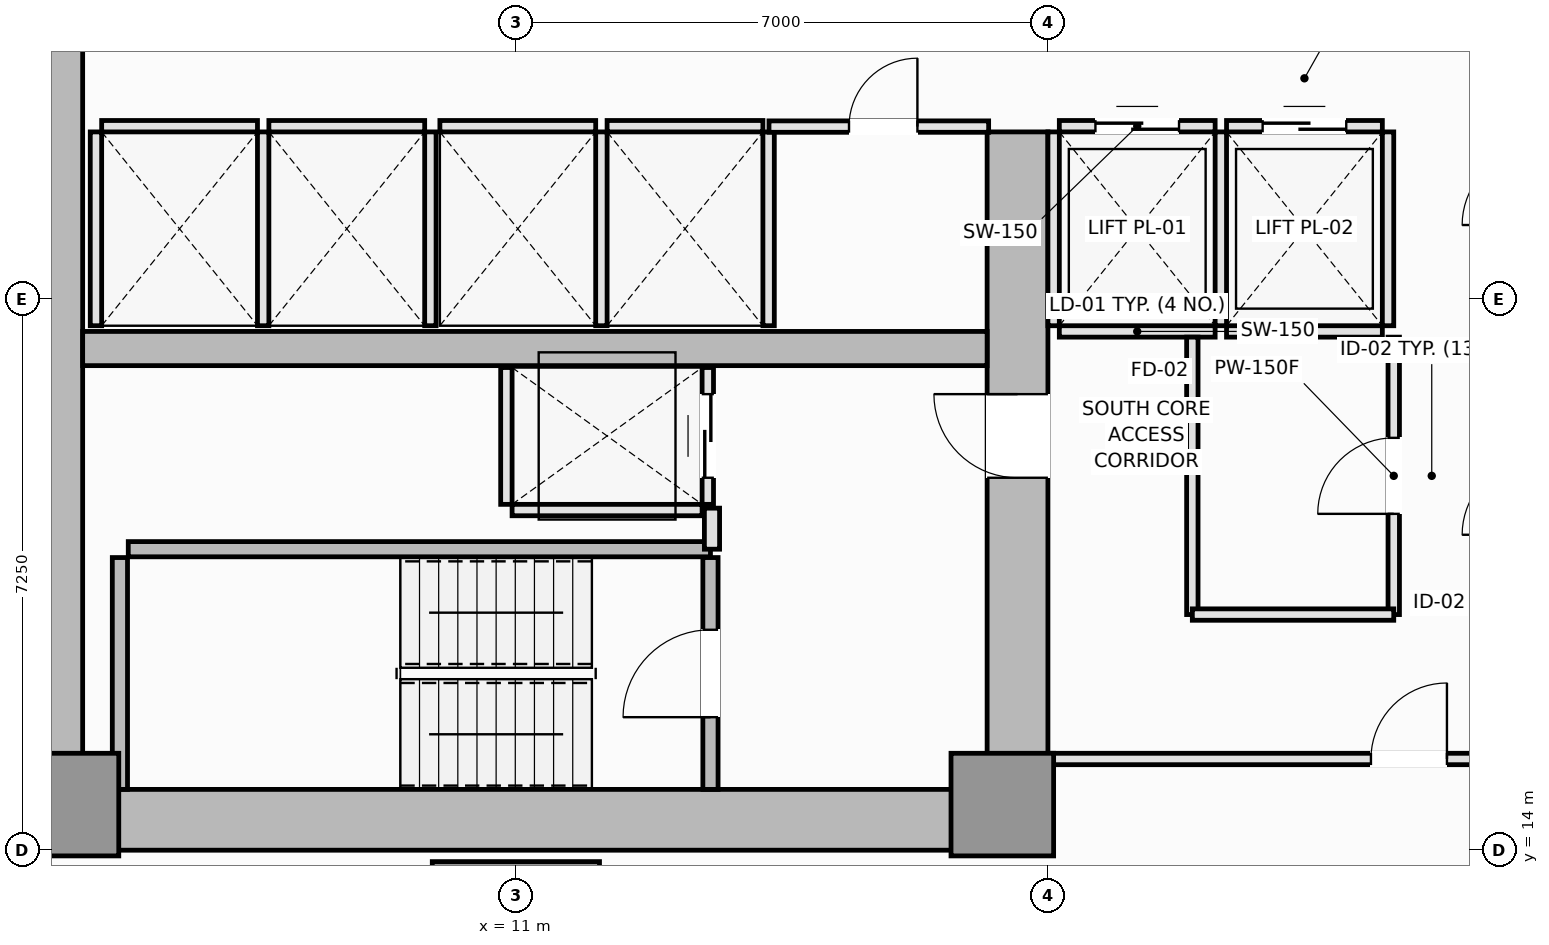
"""IFC4 building model, lengths in metres.
Left out: names, types, materials, properties, quantities, classifications, styles, units other than length and angle.
Written with IfcOpenShell. Run it as: python <this file> out.ifc"""

import sys

from ifc_helpers import new_model, si_unit, direction, frame, frame_2d, origin, origin_2d, place, context, subcontext, project, spatial, rectangle, extrude, element, fill, save


model = new_model("IFC4")
c1 = context("Model", 3, precision=1e-05, world=origin(), true_north=direction((0.0, 1.0)))
c2 = subcontext(c1, "Body", "Model", "MODEL_VIEW")
j1 = project(units=[si_unit("LENGTHUNIT", "METRE"), si_unit("PLANEANGLEUNIT", "RADIAN")], contexts=[c1])
p1 = place(None, origin())
s1 = spatial("IfcSite", under=j1, at=p1, CompositionType="ELEMENT")
p2 = place(p1, origin())
s2 = spatial("IfcBuilding", under=s1, at=p2, CompositionType="ELEMENT")
p3 = place(p2, frame((0.0, 0.0, 39.8)))
s3 = spatial("IfcBuildingStorey", under=s2, at=p3, CompositionType="ELEMENT", Elevation=39.8)
p4 = place(p3, frame((4.5, 14.4, 0.0), z_axis=(0.0, 0.0, 1.0), x_axis=(1.0, 0.0, 0.0)))
e1 = element("IfcWall", 1, at=p4, inside=s3, PredefinedType="SHEAR", context=c2, shape_type="SweptSolid", body=[
    extrude(rectangle(XDim=13.5, YDim=0.8, at=frame_2d((6.75, 0.0))), origin(), (0.0, 0.0, 1.0), 3.55),
])
p5 = place(p3, frame((4.9, 14.8, 0.0), z_axis=(0.0, 0.0, 1.0), x_axis=(0.0, 1.0, 0.0)))
e2 = element("IfcWall", 2, at=p5, inside=s3, PredefinedType="SHEAR", context=c2, shape_type="SweptSolid", body=[
    extrude(rectangle(XDim=20.9, YDim=0.8, at=frame_2d((10.45, 0.0))), origin(), (0.0, 0.0, 1.0), 3.55),
])
p6 = place(p3, frame((17.6, 14.8, 0.0), z_axis=(0.0, 0.0, 1.0), x_axis=(0.0, 1.0, 0.0)))
e3 = element("IfcWall", 3, at=p6, inside=s3, PredefinedType="SHEAR", context=c2, shape_type="SweptSolid", body=[
    extrude(rectangle(XDim=8.65, YDim=0.8, at=frame_2d((4.325, 0.0))), origin(), (0.0, 0.0, 1.0), 3.55),
])
p7 = place(p6, frame((4.1, 0.0, 0.0)))
e4 = element("IfcOpeningElement", 4, at=p7, cuts=e3, PredefinedType="OPENING", context=c2, shape_type="SweptSolid", body=[
    extrude(rectangle(XDim=1.1, YDim=2.15, at=frame_2d((0.55, 1.075))), frame((0.0, 0.41, 0.0), z_axis=(0.0, -1.0, 0.0), x_axis=(1.0, 0.0, 0.0)), (0.0, 0.0, 1.0), 0.82),
])
p8 = place(p3, frame((5.3, 20.6, 0.0), z_axis=(0.0, 0.0, 1.0), x_axis=(1.0, 0.0, 0.0)))
e5 = element("IfcWall", 5, at=p8, inside=s3, PredefinedType="SHEAR", context=c2, shape_type="SweptSolid", body=[
    extrude(rectangle(XDim=11.9, YDim=0.45, at=frame_2d((5.95, 0.0))), origin(), (0.0, 0.0, 1.0), 3.55),
])
for number, where, z_axis, x_axis in (
    (6, (5.1, 14.6, 0.0), (0.0, 0.0, 1.0), (1.0, 0.0, 0.0)),
    (7, (17.4, 14.6, 0.0), (0.0, 0.0, 1.0), (1.0, 0.0, 0.0)),
):
    element("IfcColumn", number, at=place(p3, frame(where, z_axis=z_axis, x_axis=x_axis)), inside=s3, PredefinedType="PILASTER", context=c2, shape_type="SweptSolid", body=[
        extrude(rectangle(XDim=1.35, YDim=1.35, at=origin_2d()), origin(), (0.0, 0.0, 1.0), 3.55),
    ])
p9 = place(p3, frame((11.0, 12.75, 0.0), z_axis=(0.0, 0.0, 1.0), x_axis=(1.0, 0.0, 0.0)))
e8 = element("IfcColumn", 8, at=p9, inside=s3, PredefinedType="COLUMN", context=c2, shape_type="SweptSolid", body=[
    extrude(rectangle(XDim=2.2, YDim=2.2, at=origin_2d()), origin(), (0.0, 0.0, 1.0), 3.55),
])
p10 = place(p3, frame((5.79, 14.8, 0.0), z_axis=(0.0, 0.0, 1.0), x_axis=(0.0, 1.0, 0.0)))
e9 = element("IfcWall", 9, at=p10, inside=s3, PredefinedType="SOLIDWALL", context=c2, shape_type="SweptSolid", body=[
    extrude(rectangle(XDim=3.05, YDim=0.2, at=frame_2d((1.525, 0.0))), origin(), (0.0, 0.0, 1.0), 3.55),
])
p11 = place(p3, frame((5.9, 17.96, 0.0), z_axis=(0.0, 0.0, 1.0), x_axis=(1.0, 0.0, 0.0)))
e10 = element("IfcWall", 10, at=p11, inside=s3, PredefinedType="SOLIDWALL", context=c2, shape_type="SweptSolid", body=[
    extrude(rectangle(XDim=7.66, YDim=0.2, at=frame_2d((3.83, 0.0))), origin(), (0.0, 0.0, 1.0), 3.55),
])
p12 = place(p3, frame((13.56, 14.8, 0.0), z_axis=(0.0, 0.0, 1.0), x_axis=(0.0, 1.0, 0.0)))
e11 = element("IfcWall", 11, at=p12, inside=s3, PredefinedType="SOLIDWALL", context=c2, shape_type="SweptSolid", body=[
    extrude(rectangle(XDim=3.05, YDim=0.2, at=frame_2d((1.525, 0.0))), origin(), (0.0, 0.0, 1.0), 3.55),
])
p13 = place(p12, frame((0.95, 0.0, 0.0)))
e12 = element("IfcOpeningElement", 12, at=p13, cuts=e11, PredefinedType="OPENING", context=c2, shape_type="SweptSolid", body=[
    extrude(rectangle(XDim=1.15, YDim=2.15, at=frame_2d((0.575, 1.075))), frame((0.0, 0.11, 0.0), z_axis=(0.0, -1.0, 0.0), x_axis=(1.0, 0.0, 0.0)), (0.0, 0.0, 1.0), 0.22),
])
p14 = place(p3, frame((18.15, 20.825, 0.0), z_axis=(0.0, 0.0, 1.0), x_axis=(1.0, 0.0, 0.0)))
e13 = element("IfcWall", 13, at=p14, inside=s3, PredefinedType="PARTITIONING", context=c2, shape_type="SweptSolid", body=[
    extrude(rectangle(XDim=2.05, YDim=0.15, at=frame_2d((1.025, 0.0))), origin(), (0.0, 0.0, 1.0), 3.37),
])
p15 = place(p3, frame((18.15, 23.525, 0.0), z_axis=(0.0, 0.0, 1.0), x_axis=(1.0, 0.0, 0.0)))
e14 = element("IfcWall", 14, at=p15, inside=s3, PredefinedType="PARTITIONING", context=c2, shape_type="SweptSolid", body=[
    extrude(rectangle(XDim=2.05, YDim=0.15, at=frame_2d((1.025, 0.0))), origin(), (0.0, 0.0, 1.0), 3.37),
])
p16 = place(p15, frame((0.475, 0.0, 0.0)))
e15 = element("IfcOpeningElement", 15, at=p16, cuts=e14, PredefinedType="OPENING", context=c2, shape_type="SweptSolid", body=[
    extrude(rectangle(XDim=1.1, YDim=2.2, at=frame_2d((0.55, 1.1))), frame((0.0, 0.085, 0.0), z_axis=(0.0, -1.0, 0.0), x_axis=(1.0, 0.0, 0.0)), (0.0, 0.0, 1.0), 0.17),
])
for number, where, z_axis, x_axis in (
    (16, (18.075, 20.9, 0.0), (0.0, 0.0, 1.0), (0.0, 1.0, 0.0)),
    (17, (20.275, 20.9, 0.0), (0.0, 0.0, 1.0), (0.0, 1.0, 0.0)),
):
    element("IfcWall", number, at=place(p3, frame(where, z_axis=z_axis, x_axis=x_axis)), inside=s3, PredefinedType="PARTITIONING", context=c2, shape_type="SweptSolid", body=[
        extrude(rectangle(XDim=2.55, YDim=0.15, at=frame_2d((1.275, 0.0))), origin(), (0.0, 0.0, 1.0), 3.37),
    ])
p17 = place(p3, frame((20.35, 20.825, 0.0), z_axis=(0.0, 0.0, 1.0), x_axis=(1.0, 0.0, 0.0)))
e18 = element("IfcWall", 18, at=p17, inside=s3, PredefinedType="PARTITIONING", context=c2, shape_type="SweptSolid", body=[
    extrude(rectangle(XDim=2.05, YDim=0.15, at=frame_2d((1.025, 0.0))), origin(), (0.0, 0.0, 1.0), 3.37),
])
p18 = place(p3, frame((20.35, 23.525, 0.0), z_axis=(0.0, 0.0, 1.0), x_axis=(1.0, 0.0, 0.0)))
e19 = element("IfcWall", 19, at=p18, inside=s3, PredefinedType="PARTITIONING", context=c2, shape_type="SweptSolid", body=[
    extrude(rectangle(XDim=2.05, YDim=0.15, at=frame_2d((1.025, 0.0))), origin(), (0.0, 0.0, 1.0), 3.37),
])
p19 = place(p18, frame((0.475, 0.0, 0.0)))
e20 = element("IfcOpeningElement", 20, at=p19, cuts=e19, PredefinedType="OPENING", context=c2, shape_type="SweptSolid", body=[
    extrude(rectangle(XDim=1.1, YDim=2.2, at=frame_2d((0.55, 1.1))), frame((0.0, 0.085, 0.0), z_axis=(0.0, -1.0, 0.0), x_axis=(1.0, 0.0, 0.0)), (0.0, 0.0, 1.0), 0.17),
])
p20 = place(p3, frame((22.475, 20.9, 0.0), z_axis=(0.0, 0.0, 1.0), x_axis=(0.0, 1.0, 0.0)))
e21 = element("IfcWall", 21, at=p20, inside=s3, PredefinedType="PARTITIONING", context=c2, shape_type="SweptSolid", body=[
    extrude(rectangle(XDim=2.55, YDim=0.15, at=frame_2d((1.275, 0.0))), origin(), (0.0, 0.0, 1.0), 3.37),
])
p21 = place(p3, frame((5.55, 23.525, 0.0), z_axis=(0.0, 0.0, 1.0), x_axis=(1.0, 0.0, 0.0)))
e22 = element("IfcWall", 22, at=p21, inside=s3, PredefinedType="PARTITIONING", context=c2, shape_type="SweptSolid", body=[
    extrude(rectangle(XDim=2.05, YDim=0.15, at=frame_2d((1.025, 0.0))), origin(), (0.0, 0.0, 1.0), 3.37),
])
for number, where, z_axis, x_axis in (
    (23, (5.475, 20.9, 0.0), (0.0, 0.0, 1.0), (0.0, 1.0, 0.0)),
    (24, (7.675, 20.9, 0.0), (0.0, 0.0, 1.0), (0.0, 1.0, 0.0)),
):
    element("IfcWall", number, at=place(p3, frame(where, z_axis=z_axis, x_axis=x_axis)), inside=s3, PredefinedType="PARTITIONING", context=c2, shape_type="SweptSolid", body=[
        extrude(rectangle(XDim=2.55, YDim=0.15, at=frame_2d((1.275, 0.0))), origin(), (0.0, 0.0, 1.0), 3.37),
    ])
p22 = place(p3, frame((7.75, 23.525, 0.0), z_axis=(0.0, 0.0, 1.0), x_axis=(1.0, 0.0, 0.0)))
e25 = element("IfcWall", 25, at=p22, inside=s3, PredefinedType="PARTITIONING", context=c2, shape_type="SweptSolid", body=[
    extrude(rectangle(XDim=2.05, YDim=0.15, at=frame_2d((1.025, 0.0))), origin(), (0.0, 0.0, 1.0), 3.37),
])
p23 = place(p3, frame((9.875, 20.9, 0.0), z_axis=(0.0, 0.0, 1.0), x_axis=(0.0, 1.0, 0.0)))
e26 = element("IfcWall", 26, at=p23, inside=s3, PredefinedType="PARTITIONING", context=c2, shape_type="SweptSolid", body=[
    extrude(rectangle(XDim=2.55, YDim=0.15, at=frame_2d((1.275, 0.0))), origin(), (0.0, 0.0, 1.0), 3.37),
])
p24 = place(p3, frame((10.0, 23.525, 0.0), z_axis=(0.0, 0.0, 1.0), x_axis=(1.0, 0.0, 0.0)))
e27 = element("IfcWall", 27, at=p24, inside=s3, PredefinedType="PARTITIONING", context=c2, shape_type="SweptSolid", body=[
    extrude(rectangle(XDim=2.05, YDim=0.15, at=frame_2d((1.025, 0.0))), origin(), (0.0, 0.0, 1.0), 3.37),
])
p25 = place(p3, frame((12.125, 20.9, 0.0), z_axis=(0.0, 0.0, 1.0), x_axis=(0.0, 1.0, 0.0)))
e28 = element("IfcWall", 28, at=p25, inside=s3, PredefinedType="PARTITIONING", context=c2, shape_type="SweptSolid", body=[
    extrude(rectangle(XDim=2.55, YDim=0.15, at=frame_2d((1.275, 0.0))), origin(), (0.0, 0.0, 1.0), 3.37),
])
p26 = place(p3, frame((12.2, 23.525, 0.0), z_axis=(0.0, 0.0, 1.0), x_axis=(1.0, 0.0, 0.0)))
e29 = element("IfcWall", 29, at=p26, inside=s3, PredefinedType="PARTITIONING", context=c2, shape_type="SweptSolid", body=[
    extrude(rectangle(XDim=2.05, YDim=0.15, at=frame_2d((1.025, 0.0))), origin(), (0.0, 0.0, 1.0), 3.37),
])
p27 = place(p3, frame((14.325, 20.9, 0.0), z_axis=(0.0, 0.0, 1.0), x_axis=(0.0, 1.0, 0.0)))
e30 = element("IfcWall", 30, at=p27, inside=s3, PredefinedType="PARTITIONING", context=c2, shape_type="SweptSolid", body=[
    extrude(rectangle(XDim=2.55, YDim=0.15, at=frame_2d((1.275, 0.0))), origin(), (0.0, 0.0, 1.0), 3.37),
])
p28 = place(p3, frame((10.95, 18.475, 0.0), z_axis=(0.0, 0.0, 1.0), x_axis=(1.0, 0.0, 0.0)))
e31 = element("IfcWall", 31, at=p28, inside=s3, PredefinedType="PARTITIONING", context=c2, shape_type="SweptSolid", body=[
    extrude(rectangle(XDim=2.5, YDim=0.15, at=frame_2d((1.25, 0.0))), origin(), (0.0, 0.0, 1.0), 3.37),
])
p29 = place(p3, frame((10.875, 18.55, 0.0), z_axis=(0.0, 0.0, 1.0), x_axis=(0.0, 1.0, 0.0)))
e32 = element("IfcWall", 32, at=p29, inside=s3, PredefinedType="PARTITIONING", context=c2, shape_type="SweptSolid", body=[
    extrude(rectangle(XDim=1.8, YDim=0.15, at=frame_2d((0.9, 0.0))), origin(), (0.0, 0.0, 1.0), 3.37),
])
p30 = place(p3, frame((13.525, 18.55, 0.0), z_axis=(0.0, 0.0, 1.0), x_axis=(0.0, 1.0, 0.0)))
e33 = element("IfcWall", 33, at=p30, inside=s3, PredefinedType="PARTITIONING", context=c2, shape_type="SweptSolid", body=[
    extrude(rectangle(XDim=1.8, YDim=0.15, at=frame_2d((0.9, 0.0))), origin(), (0.0, 0.0, 1.0), 3.37),
])
p31 = place(p30, frame((0.35, 0.0, 0.0)))
e34 = element("IfcOpeningElement", 34, at=p31, cuts=e33, PredefinedType="OPENING", context=c2, shape_type="SweptSolid", body=[
    extrude(rectangle(XDim=1.1, YDim=2.2, at=frame_2d((0.55, 1.1))), frame((0.0, 0.085, 0.0), z_axis=(0.0, -1.0, 0.0), x_axis=(1.0, 0.0, 0.0)), (0.0, 0.0, 1.0), 0.17),
])
p32 = place(p3, frame((13.58, 17.96, 0.0), z_axis=(0.0, 0.0, 1.0), x_axis=(0.0, 1.0, 0.0)))
e35 = element("IfcWall", 35, at=p32, inside=s3, PredefinedType="PARTITIONING", context=c2, shape_type="SweptSolid", body=[
    extrude(rectangle(XDim=0.54, YDim=0.2, at=frame_2d((0.27, 0.0))), origin(), (0.0, 0.0, 1.0), 3.37),
])
p33 = place(p3, frame((14.33, 23.52, 0.0), z_axis=(0.0, 0.0, 1.0), x_axis=(1.0, 0.0, 0.0)))
e36 = element("IfcWall", 36, at=p33, inside=s3, PredefinedType="PARTITIONING", context=c2, shape_type="SweptSolid", body=[
    extrude(rectangle(XDim=2.89, YDim=0.15, at=frame_2d((1.445, 0.0))), origin(), (0.0, 0.0, 1.0), 3.37),
])
p34 = place(p33, frame((1.053, 0.0, 0.0)))
e37 = element("IfcOpeningElement", 37, at=p34, cuts=e36, PredefinedType="OPENING", context=c2, shape_type="SweptSolid", body=[
    extrude(rectangle(XDim=0.9, YDim=2.1, at=frame_2d((0.45, 1.05))), frame((0.0, 0.085, 0.0), z_axis=(0.0, -1.0, 0.0), x_axis=(1.0, 0.0, 0.0)), (0.0, 0.0, 1.0), 0.17),
])
p35 = place(p3, frame((22.55, 17.1, 0.0), z_axis=(0.0, 0.0, 1.0), x_axis=(0.0, 1.0, 0.0)))
e38 = element("IfcWall", 38, at=p35, inside=s3, PredefinedType="PARTITIONING", context=c2, shape_type="SweptSolid", body=[
    extrude(rectangle(XDim=3.65, YDim=0.15, at=frame_2d((1.825, 0.0))), origin(), (0.0, 0.0, 1.0), 3.01),
])
p36 = place(p35, frame((1.325, 0.0, 0.0)))
e39 = element("IfcOpeningElement", 39, at=p36, cuts=e38, PredefinedType="OPENING", context=c2, shape_type="SweptSolid", body=[
    extrude(rectangle(XDim=1.0, YDim=2.15, at=frame_2d((0.5, 1.075))), frame((0.0, 0.085, 0.0), z_axis=(0.0, -1.0, 0.0), x_axis=(1.0, 0.0, 0.0)), (0.0, 0.0, 1.0), 0.17),
])
p37 = place(p3, frame((19.9, 17.1, 0.0), z_axis=(0.0, 0.0, 1.0), x_axis=(0.0, 1.0, 0.0)))
e40 = element("IfcWall", 40, at=p37, inside=s3, PredefinedType="PARTITIONING", context=c2, shape_type="SweptSolid", body=[
    extrude(rectangle(XDim=3.65, YDim=0.15, at=frame_2d((1.825, 0.0))), origin(), (0.0, 0.0, 1.0), 3.37),
])
p38 = place(p3, frame((19.9, 17.1, 0.0), z_axis=(0.0, 0.0, 1.0), x_axis=(1.0, 0.0, 0.0)))
e41 = element("IfcWall", 41, at=p38, inside=s3, PredefinedType="PARTITIONING", context=c2, shape_type="SweptSolid", body=[
    extrude(rectangle(XDim=2.65, YDim=0.15, at=frame_2d((1.325, 0.0))), origin(), (0.0, 0.0, 1.0), 3.37),
])
p39 = place(p3, frame((18.0, 15.2, 0.0), z_axis=(0.0, 0.0, 1.0), x_axis=(1.0, 0.0, 0.0)))
e42 = element("IfcWall", 42, at=p39, inside=s3, PredefinedType="PARTITIONING", context=c2, shape_type="SweptSolid", body=[
    extrude(rectangle(XDim=9.5, YDim=0.15, at=frame_2d((4.75, 0.0))), origin(), (0.0, 0.0, 1.0), 3.37),
])
p40 = place(p39, frame((4.25, 0.0, 0.0)))
e43 = element("IfcOpeningElement", 43, at=p40, cuts=e42, PredefinedType="OPENING", context=c2, shape_type="SweptSolid", body=[
    extrude(rectangle(XDim=1.0, YDim=2.15, at=frame_2d((0.5, 1.075))), frame((0.0, 0.085, 0.0), z_axis=(0.0, -1.0, 0.0), x_axis=(1.0, 0.0, 0.0)), (0.0, 0.0, 1.0), 0.17),
])
p41 = place(p13, origin())
e44 = element("IfcDoor", 44, at=p41, inside=s3, OperationType="SINGLE_SWING_LEFT", PredefinedType="DOOR", context=c2, shape_type="SweptSolid", body=[
    extrude(rectangle(XDim=1.15, YDim=2.15, at=frame_2d((0.575, 1.075))), frame((0.0, 0.025, 0.0), z_axis=(0.0, -1.0, 0.0), x_axis=(1.0, 0.0, 0.0)), (0.0, 0.0, 1.0), 0.05),
])
fill(e12, e44)
p42 = place(p16, origin())
e45 = element("IfcDoor", 45, at=p42, inside=s3, OperationType="DOUBLE_DOOR_SLIDING", PredefinedType="DOOR", context=c2, shape_type="SweptSolid", body=[
    extrude(rectangle(XDim=1.1, YDim=2.2, at=frame_2d((0.55, 1.1))), frame((0.0, 0.025, 0.0), z_axis=(0.0, -1.0, 0.0), x_axis=(1.0, 0.0, 0.0)), (0.0, 0.0, 1.0), 0.05),
])
fill(e15, e45)
p43 = place(p19, origin())
e46 = element("IfcDoor", 46, at=p43, inside=s3, OperationType="DOUBLE_DOOR_SLIDING", PredefinedType="DOOR", context=c2, shape_type="SweptSolid", body=[
    extrude(rectangle(XDim=1.1, YDim=2.2, at=frame_2d((0.55, 1.1))), frame((0.0, 0.025, 0.0), z_axis=(0.0, -1.0, 0.0), x_axis=(1.0, 0.0, 0.0)), (0.0, 0.0, 1.0), 0.05),
])
fill(e20, e46)
p44 = place(p31, origin())
e47 = element("IfcDoor", 47, at=p44, inside=s3, OperationType="DOUBLE_DOOR_SLIDING", PredefinedType="DOOR", context=c2, shape_type="SweptSolid", body=[
    extrude(rectangle(XDim=1.1, YDim=2.2, at=frame_2d((0.55, 1.1))), frame((0.0, 0.025, 0.0), z_axis=(0.0, -1.0, 0.0), x_axis=(1.0, 0.0, 0.0)), (0.0, 0.0, 1.0), 0.05),
])
fill(e34, e47)
p45 = place(p7, origin())
e48 = element("IfcDoor", 48, at=p45, inside=s3, OperationType="SINGLE_SWING_RIGHT", PredefinedType="DOOR", context=c2, shape_type="SweptSolid", body=[
    extrude(rectangle(XDim=1.1, YDim=2.15, at=frame_2d((0.55, 1.075))), frame((0.0, 0.025, 0.0), z_axis=(0.0, -1.0, 0.0), x_axis=(1.0, 0.0, 0.0)), (0.0, 0.0, 1.0), 0.05),
])
fill(e4, e48)
p46 = place(p34, origin())
e49 = element("IfcDoor", 49, at=p46, inside=s3, OperationType="SINGLE_SWING_RIGHT", PredefinedType="DOOR", context=c2, shape_type="SweptSolid", body=[
    extrude(rectangle(XDim=0.9, YDim=2.1, at=frame_2d((0.45, 1.05))), frame((0.0, 0.025, 0.0), z_axis=(0.0, -1.0, 0.0), x_axis=(1.0, 0.0, 0.0)), (0.0, 0.0, 1.0), 0.05),
])
fill(e37, e49)
p47 = place(p36, origin())
e50 = element("IfcDoor", 50, at=p47, inside=s3, OperationType="SINGLE_SWING_LEFT", PredefinedType="DOOR", context=c2, shape_type="SweptSolid", body=[
    extrude(rectangle(XDim=1.0, YDim=2.15, at=frame_2d((0.5, 1.075))), frame((0.0, 0.025, 0.0), z_axis=(0.0, -1.0, 0.0), x_axis=(1.0, 0.0, 0.0)), (0.0, 0.0, 1.0), 0.05),
])
fill(e39, e50)
p48 = place(p40, origin())
e51 = element("IfcDoor", 51, at=p48, inside=s3, OperationType="SINGLE_SWING_RIGHT", PredefinedType="DOOR", context=c2, shape_type="SweptSolid", body=[
    extrude(rectangle(XDim=1.0, YDim=2.15, at=frame_2d((0.5, 1.075))), frame((0.0, 0.025, 0.0), z_axis=(0.0, -1.0, 0.0), x_axis=(1.0, 0.0, 0.0)), (0.0, 0.0, 1.0), 0.05),
])
fill(e43, e51)
save(model, sys.argv[1])
